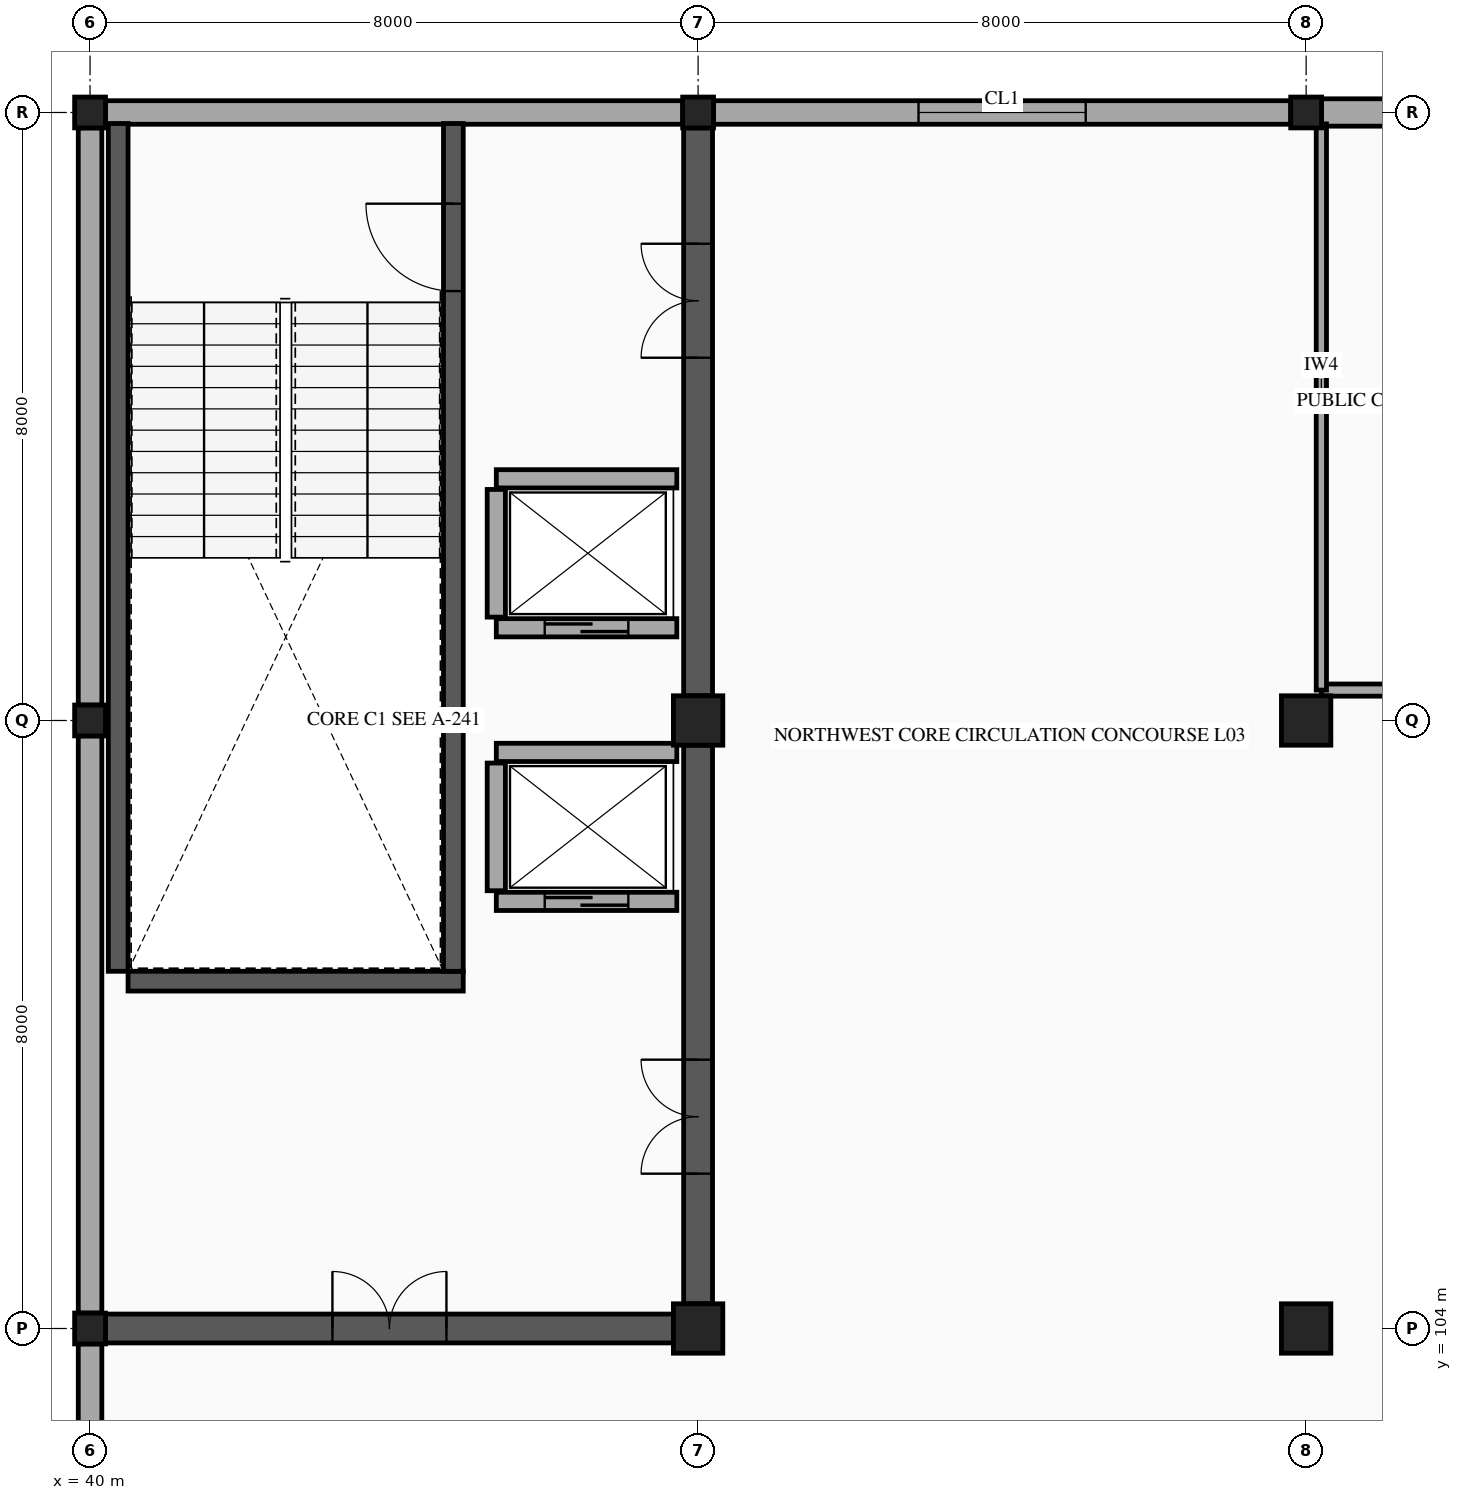
"""IFC4 building model, lengths in metres.
Left out: names, types, materials, properties, quantities, classifications, styles, units other than length and angle.
Written with IfcOpenShell. Run it as: python <this file> out.ifc"""

import sys

from ifc_helpers import new_model, si_unit, direction, frame, frame_2d, origin, origin_2d, place, context, subcontext, project, spatial, rectangle, hollow_rectangle, extrude, element, fill, save


model = new_model("IFC4")
c1 = context("Model", 3, precision=1e-05, world=origin(), true_north=direction((0.0, 1.0)))
c2 = subcontext(c1, "Body", "Model", "MODEL_VIEW")
j1 = project(units=[si_unit("LENGTHUNIT", "METRE"), si_unit("PLANEANGLEUNIT", "RADIAN")], contexts=[c1])
p1 = place(None, origin())
s1 = spatial("IfcSite", under=j1, at=p1, CompositionType="ELEMENT")
p2 = place(p1, origin())
s2 = spatial("IfcBuilding", under=s1, at=p2, CompositionType="ELEMENT")
p3 = place(p2, frame((0.0, 0.0, 14.9)))
s3 = spatial("IfcBuildingStorey", under=s2, at=p3, CompositionType="ELEMENT", Elevation=14.9)
for number, where, z_axis, x_axis in (
    (1, (40.0, 104.0, 0.0), (0.0, 0.0, 1.0), (1.0, 0.0, 0.0)),
    (2, (40.0, 112.0, 0.0), (0.0, 0.0, 1.0), (1.0, 0.0, 0.0)),
    (3, (40.0, 120.0, 0.0), (0.0, 0.0, 1.0), (1.0, 0.0, 0.0)),
):
    element("IfcColumn", number, at=place(p3, frame(where, z_axis=z_axis, x_axis=x_axis)), inside=s3, PredefinedType="COLUMN", context=c2, shape_type="SweptSolid", body=[
        extrude(hollow_rectangle(XDim=0.406, YDim=0.406, WallThickness=0.015, InnerFilletRadius=0.015, OuterFilletRadius=0.029, at=origin_2d()), origin(), (0.0, 0.0, 1.0), 4.5),
    ])
for number, where, z_axis, x_axis in (
    (4, (48.0, 104.0, 0.0), (0.0, 0.0, 1.0), (1.0, 0.0, 0.0)),
    (5, (48.0, 112.0, 0.0), (0.0, 0.0, 1.0), (1.0, 0.0, 0.0)),
):
    element("IfcColumn", number, at=place(p3, frame(where, z_axis=z_axis, x_axis=x_axis)), inside=s3, PredefinedType="COLUMN", context=c2, shape_type="SweptSolid", body=[
        extrude(rectangle(XDim=0.65, YDim=0.65, at=origin_2d()), origin(), (0.0, 0.0, 1.0), 4.5),
    ])
p4 = place(p3, frame((48.0, 120.0, 0.0), z_axis=(0.0, 0.0, 1.0), x_axis=(1.0, 0.0, 0.0)))
e6 = element("IfcColumn", 6, at=p4, inside=s3, PredefinedType="COLUMN", context=c2, shape_type="SweptSolid", body=[
    extrude(hollow_rectangle(XDim=0.406, YDim=0.406, WallThickness=0.015, InnerFilletRadius=0.015, OuterFilletRadius=0.029, at=origin_2d()), origin(), (0.0, 0.0, 1.0), 4.5),
])
for number, where, z_axis, x_axis in (
    (7, (56.0, 104.0, 0.0), (0.0, 0.0, 1.0), (1.0, 0.0, 0.0)),
    (8, (56.0, 112.0, 0.0), (0.0, 0.0, 1.0), (1.0, 0.0, 0.0)),
):
    element("IfcColumn", number, at=place(p3, frame(where, z_axis=z_axis, x_axis=x_axis)), inside=s3, PredefinedType="COLUMN", context=c2, shape_type="SweptSolid", body=[
        extrude(rectangle(XDim=0.65, YDim=0.65, at=origin_2d()), origin(), (0.0, 0.0, 1.0), 4.5),
    ])
p5 = place(p3, frame((56.0, 120.0, 0.0), z_axis=(0.0, 0.0, 1.0), x_axis=(1.0, 0.0, 0.0)))
e9 = element("IfcColumn", 9, at=p5, inside=s3, PredefinedType="COLUMN", context=c2, shape_type="SweptSolid", body=[
    extrude(hollow_rectangle(XDim=0.406, YDim=0.406, WallThickness=0.015, InnerFilletRadius=0.015, OuterFilletRadius=0.029, at=origin_2d()), origin(), (0.0, 0.0, 1.0), 4.5),
])
p6 = place(p3, frame((40.0, 96.203, 0.0), z_axis=(0.0, 0.0, 1.0), x_axis=(0.0, 1.0, 0.0)))
e10 = element("IfcWall", 10, at=p6, inside=s3, PredefinedType="STANDARD", context=c2, shape_type="SweptSolid", body=[
    extrude(rectangle(XDim=7.594, YDim=0.31, at=frame_2d((3.797, 0.0))), origin(), (0.0, 0.0, 1.0), 3.48),
])
p7 = place(p6, frame((2.697, 0.0, 0.8)))
e11 = element("IfcOpeningElement", 11, at=p7, cuts=e10, PredefinedType="OPENING", context=c2, shape_type="SweptSolid", body=[
    extrude(rectangle(XDim=2.2, YDim=2.05, at=frame_2d((1.1, 1.025))), frame((0.0, 0.165, 0.0), z_axis=(0.0, -1.0, 0.0), x_axis=(1.0, 0.0, 0.0)), (0.0, 0.0, 1.0), 0.33),
])
for number, where, z_axis, x_axis in (
    (12, (40.0, 104.203, 0.0), (0.0, 0.0, 1.0), (0.0, 1.0, 0.0)),
    (13, (40.0, 112.203, 0.0), (0.0, 0.0, 1.0), (0.0, 1.0, 0.0)),
    (14, (40.203, 120.0, 0.0), (0.0, 0.0, 1.0), (1.0, 0.0, 0.0)),
):
    element("IfcWall", number, at=place(p3, frame(where, z_axis=z_axis, x_axis=x_axis)), inside=s3, PredefinedType="STANDARD", context=c2, shape_type="SweptSolid", body=[
        extrude(rectangle(XDim=7.594, YDim=0.31, at=frame_2d((3.797, 0.0))), origin(), (0.0, 0.0, 1.0), 3.48),
    ])
p8 = place(p3, frame((48.203, 120.0, 0.0), z_axis=(0.0, 0.0, 1.0), x_axis=(1.0, 0.0, 0.0)))
e15 = element("IfcWall", 15, at=p8, inside=s3, PredefinedType="STANDARD", context=c2, shape_type="SweptSolid", body=[
    extrude(rectangle(XDim=7.594, YDim=0.31, at=frame_2d((3.797, 0.0))), origin(), (0.0, 0.0, 1.0), 3.48),
])
p9 = place(p8, frame((2.697, 0.0, 0.8)))
e16 = element("IfcOpeningElement", 16, at=p9, cuts=e15, PredefinedType="OPENING", context=c2, shape_type="SweptSolid", body=[
    extrude(rectangle(XDim=2.2, YDim=2.05, at=frame_2d((1.1, 1.025))), frame((0.0, 0.165, 0.0), z_axis=(0.0, -1.0, 0.0), x_axis=(1.0, 0.0, 0.0)), (0.0, 0.0, 1.0), 0.33),
])
p10 = place(p3, frame((56.203, 120.0, 0.0), z_axis=(0.0, 0.0, 1.0), x_axis=(1.0, 0.0, 0.0)))
e17 = element("IfcWall", 17, at=p10, inside=s3, PredefinedType="SOLIDWALL", context=c2, shape_type="SweptSolid", body=[
    extrude(rectangle(XDim=7.594, YDim=0.36, at=frame_2d((3.797, 0.0))), origin(), (0.0, 0.0, 1.0), 3.48),
])
p11 = place(p3, frame((40.5, 108.57, 0.0), z_axis=(0.0, 0.0, 1.0), x_axis=(1.0, 0.0, 0.0)))
e18 = element("IfcWall", 18, at=p11, inside=s3, PredefinedType="SHEAR", context=c2, shape_type="SweptSolid", body=[
    extrude(rectangle(XDim=4.41, YDim=0.26, at=frame_2d((2.205, 0.0))), origin(), (0.0, 0.0, 1.0), 4.28),
])
p12 = place(p3, frame((40.37, 108.7, 0.0), z_axis=(0.0, 0.0, 1.0), x_axis=(0.0, 1.0, 0.0)))
e19 = element("IfcWall", 19, at=p12, inside=s3, PredefinedType="SHEAR", context=c2, shape_type="SweptSolid", body=[
    extrude(rectangle(XDim=11.155, YDim=0.26, at=frame_2d((5.578, 0.0))), origin(), (0.0, 0.0, 1.0), 4.28),
])
p13 = place(p3, frame((44.78, 108.7, 0.0), z_axis=(0.0, 0.0, 1.0), x_axis=(0.0, 1.0, 0.0)))
e20 = element("IfcWall", 20, at=p13, inside=s3, PredefinedType="SHEAR", context=c2, shape_type="SweptSolid", body=[
    extrude(rectangle(XDim=11.155, YDim=0.26, at=frame_2d((5.578, 0.0))), origin(), (0.0, 0.0, 1.0), 4.28),
])
p14 = place(p13, frame((8.95, 0.0, 0.0)))
e21 = element("IfcOpeningElement", 21, at=p14, cuts=e20, PredefinedType="OPENING", context=c2, shape_type="SweptSolid", body=[
    extrude(rectangle(XDim=1.15, YDim=2.15, at=frame_2d((0.575, 1.075))), frame((0.0, 0.14, 0.0), z_axis=(0.0, -1.0, 0.0), x_axis=(1.0, 0.0, 0.0)), (0.0, 0.0, 1.0), 0.28),
])
p15 = place(p3, frame((40.203, 104.0, 0.0), z_axis=(0.0, 0.0, 1.0), x_axis=(1.0, 0.0, 0.0)))
e22 = element("IfcWall", 22, at=p15, inside=s3, PredefinedType="SHEAR", context=c2, shape_type="SweptSolid", body=[
    extrude(rectangle(XDim=7.472, YDim=0.38, at=frame_2d((3.736, 0.0))), origin(), (0.0, 0.0, 1.0), 4.28),
])
p16 = place(p15, frame((2.986, 0.0, 0.0)))
e23 = element("IfcOpeningElement", 23, at=p16, cuts=e22, PredefinedType="OPENING", context=c2, shape_type="SweptSolid", body=[
    extrude(rectangle(XDim=1.5, YDim=2.15, at=frame_2d((0.75, 1.075))), frame((0.0, 0.2, 0.0), z_axis=(0.0, -1.0, 0.0), x_axis=(1.0, 0.0, 0.0)), (0.0, 0.0, 1.0), 0.4),
])
p17 = place(p3, frame((48.0, 104.325, 0.0), z_axis=(0.0, 0.0, 1.0), x_axis=(0.0, 1.0, 0.0)))
e24 = element("IfcWall", 24, at=p17, inside=s3, PredefinedType="SHEAR", context=c2, shape_type="SweptSolid", body=[
    extrude(rectangle(XDim=7.35, YDim=0.38, at=frame_2d((3.675, 0.0))), origin(), (0.0, 0.0, 1.0), 4.28),
])
p18 = place(p17, frame((1.712, 0.0, 0.0)))
e25 = element("IfcOpeningElement", 25, at=p18, cuts=e24, PredefinedType="OPENING", context=c2, shape_type="SweptSolid", body=[
    extrude(rectangle(XDim=1.5, YDim=2.15, at=frame_2d((0.75, 1.075))), frame((0.0, 0.2, 0.0), z_axis=(0.0, -1.0, 0.0), x_axis=(1.0, 0.0, 0.0)), (0.0, 0.0, 1.0), 0.4),
])
p19 = place(p3, frame((48.0, 112.325, 0.0), z_axis=(0.0, 0.0, 1.0), x_axis=(0.0, 1.0, 0.0)))
e26 = element("IfcWall", 26, at=p19, inside=s3, PredefinedType="SHEAR", context=c2, shape_type="SweptSolid", body=[
    extrude(rectangle(XDim=7.472, YDim=0.38, at=frame_2d((3.736, 0.0))), origin(), (0.0, 0.0, 1.0), 4.28),
])
p20 = place(p19, frame((4.448, 0.0, 0.0)))
e27 = element("IfcOpeningElement", 27, at=p20, cuts=e26, PredefinedType="OPENING", context=c2, shape_type="SweptSolid", body=[
    extrude(rectangle(XDim=1.5, YDim=2.15, at=frame_2d((0.75, 1.075))), frame((0.0, 0.2, 0.0), z_axis=(0.0, -1.0, 0.0), x_axis=(1.0, 0.0, 0.0)), (0.0, 0.0, 1.0), 0.4),
])
p21 = place(p3, frame((45.345, 113.22, 0.0), z_axis=(0.0, 0.0, 1.0), x_axis=(1.0, 0.0, 0.0)))
e28 = element("IfcWall", 28, at=p21, inside=s3, PredefinedType="PARTITIONING", context=c2, shape_type="SweptSolid", body=[
    extrude(rectangle(XDim=2.375, YDim=0.24, at=frame_2d((1.188, 0.0))), origin(), (0.0, 0.0, 1.0), 4.28),
])
p22 = place(p21, frame((0.637, 0.0, 0.0)))
e29 = element("IfcOpeningElement", 29, at=p22, cuts=e28, PredefinedType="OPENING", context=c2, shape_type="SweptSolid", body=[
    extrude(rectangle(XDim=1.1, YDim=2.15, at=frame_2d((0.55, 1.075))), frame((0.0, 0.13, 0.0), z_axis=(0.0, -1.0, 0.0), x_axis=(1.0, 0.0, 0.0)), (0.0, 0.0, 1.0), 0.26),
])
p23 = place(p3, frame((45.345, 115.18, 0.0), z_axis=(0.0, 0.0, 1.0), x_axis=(1.0, 0.0, 0.0)))
e30 = element("IfcWall", 30, at=p23, inside=s3, PredefinedType="PARTITIONING", context=c2, shape_type="SweptSolid", body=[
    extrude(rectangle(XDim=2.375, YDim=0.24, at=frame_2d((1.188, 0.0))), origin(), (0.0, 0.0, 1.0), 4.28),
])
p24 = place(p3, frame((45.345, 113.36, 0.0), z_axis=(0.0, 0.0, 1.0), x_axis=(0.0, 1.0, 0.0)))
e31 = element("IfcWall", 31, at=p24, inside=s3, PredefinedType="PARTITIONING", context=c2, shape_type="SweptSolid", body=[
    extrude(rectangle(XDim=1.68, YDim=0.24, at=frame_2d((0.84, 0.0))), origin(), (0.0, 0.0, 1.0), 4.28),
])
p25 = place(p3, frame((45.345, 109.62, 0.0), z_axis=(0.0, 0.0, 1.0), x_axis=(1.0, 0.0, 0.0)))
e32 = element("IfcWall", 32, at=p25, inside=s3, PredefinedType="PARTITIONING", context=c2, shape_type="SweptSolid", body=[
    extrude(rectangle(XDim=2.375, YDim=0.24, at=frame_2d((1.188, 0.0))), origin(), (0.0, 0.0, 1.0), 4.28),
])
p26 = place(p25, frame((0.637, 0.0, 0.0)))
e33 = element("IfcOpeningElement", 33, at=p26, cuts=e32, PredefinedType="OPENING", context=c2, shape_type="SweptSolid", body=[
    extrude(rectangle(XDim=1.1, YDim=2.15, at=frame_2d((0.55, 1.075))), frame((0.0, 0.13, 0.0), z_axis=(0.0, -1.0, 0.0), x_axis=(1.0, 0.0, 0.0)), (0.0, 0.0, 1.0), 0.26),
])
p27 = place(p3, frame((45.345, 111.58, 0.0), z_axis=(0.0, 0.0, 1.0), x_axis=(1.0, 0.0, 0.0)))
e34 = element("IfcWall", 34, at=p27, inside=s3, PredefinedType="PARTITIONING", context=c2, shape_type="SweptSolid", body=[
    extrude(rectangle(XDim=2.375, YDim=0.24, at=frame_2d((1.188, 0.0))), origin(), (0.0, 0.0, 1.0), 4.28),
])
p28 = place(p3, frame((45.345, 109.76, 0.0), z_axis=(0.0, 0.0, 1.0), x_axis=(0.0, 1.0, 0.0)))
e35 = element("IfcWall", 35, at=p28, inside=s3, PredefinedType="PARTITIONING", context=c2, shape_type="SweptSolid", body=[
    extrude(rectangle(XDim=1.68, YDim=0.24, at=frame_2d((0.84, 0.0))), origin(), (0.0, 0.0, 1.0), 4.28),
])
p29 = place(p3, frame((56.2, 112.4, 0.0), z_axis=(0.0, 0.0, 1.0), x_axis=(1.0, 0.0, 0.0)))
e36 = element("IfcWall", 36, at=p29, inside=s3, PredefinedType="PARTITIONING", context=c2, shape_type="SweptSolid", body=[
    extrude(rectangle(XDim=4.7, YDim=0.16, at=frame_2d((2.35, 0.0))), origin(), (0.0, 0.0, 1.0), 3.48),
])
p30 = place(p29, frame((3.193, 0.0, 0.0)))
e37 = element("IfcOpeningElement", 37, at=p30, cuts=e36, PredefinedType="OPENING", context=c2, shape_type="SweptSolid", body=[
    extrude(rectangle(XDim=0.92, YDim=2.1, at=frame_2d((0.46, 1.05))), frame((0.0, 0.09, 0.0), z_axis=(0.0, -1.0, 0.0), x_axis=(1.0, 0.0, 0.0)), (0.0, 0.0, 1.0), 0.18),
])
p31 = place(p3, frame((56.2, 112.4, 0.0), z_axis=(0.0, 0.0, 1.0), x_axis=(0.0, 1.0, 0.0)))
e38 = element("IfcWall", 38, at=p31, inside=s3, PredefinedType="PARTITIONING", context=c2, shape_type="SweptSolid", body=[
    extrude(rectangle(XDim=7.45, YDim=0.135, at=frame_2d((3.725, 0.0))), origin(), (0.0, 0.0, 1.0), 3.48),
])
p32 = place(p9, origin())
e39 = element("IfcWindow", 39, at=p32, inside=s3, PartitioningType="DOUBLE_PANEL_VERTICAL", PredefinedType="WINDOW", context=c2, shape_type="SweptSolid", body=[
    extrude(rectangle(XDim=2.2, YDim=2.05, at=frame_2d((1.1, 1.025))), frame((0.0, 0.03, 0.0), z_axis=(0.0, -1.0, 0.0), x_axis=(1.0, 0.0, 0.0)), (0.0, 0.0, 1.0), 0.06),
])
fill(e16, e39)
p33 = place(p14, origin())
e40 = element("IfcDoor", 40, at=p33, inside=s3, OperationType="SINGLE_SWING_RIGHT", PredefinedType="DOOR", context=c2, shape_type="SweptSolid", body=[
    extrude(rectangle(XDim=1.15, YDim=2.15, at=frame_2d((0.575, 1.075))), frame((0.0, 0.025, 0.0), z_axis=(0.0, -1.0, 0.0), x_axis=(1.0, 0.0, 0.0)), (0.0, 0.0, 1.0), 0.05),
])
fill(e21, e40)
p34 = place(p16, origin())
e41 = element("IfcDoor", 41, at=p34, inside=s3, OperationType="DOUBLE_DOOR_SINGLE_SWING", PredefinedType="DOOR", context=c2, shape_type="SweptSolid", body=[
    extrude(rectangle(XDim=1.5, YDim=2.15, at=frame_2d((0.75, 1.075))), frame((0.0, 0.025, 0.0), z_axis=(0.0, -1.0, 0.0), x_axis=(1.0, 0.0, 0.0)), (0.0, 0.0, 1.0), 0.05),
])
fill(e23, e41)
p35 = place(p18, origin())
e42 = element("IfcDoor", 42, at=p35, inside=s3, OperationType="DOUBLE_DOOR_SINGLE_SWING", PredefinedType="DOOR", context=c2, shape_type="SweptSolid", body=[
    extrude(rectangle(XDim=1.5, YDim=2.15, at=frame_2d((0.75, 1.075))), frame((0.0, 0.025, 0.0), z_axis=(0.0, -1.0, 0.0), x_axis=(1.0, 0.0, 0.0)), (0.0, 0.0, 1.0), 0.05),
])
fill(e25, e42)
p36 = place(p20, origin())
e43 = element("IfcDoor", 43, at=p36, inside=s3, OperationType="DOUBLE_DOOR_SINGLE_SWING", PredefinedType="DOOR", context=c2, shape_type="SweptSolid", body=[
    extrude(rectangle(XDim=1.5, YDim=2.15, at=frame_2d((0.75, 1.075))), frame((0.0, 0.025, 0.0), z_axis=(0.0, -1.0, 0.0), x_axis=(1.0, 0.0, 0.0)), (0.0, 0.0, 1.0), 0.05),
])
fill(e27, e43)
p37 = place(p22, origin())
e44 = element("IfcDoor", 44, at=p37, inside=s3, OperationType="SLIDING_TO_LEFT", PredefinedType="DOOR", context=c2, shape_type="SweptSolid", body=[
    extrude(rectangle(XDim=1.1, YDim=2.15, at=frame_2d((0.55, 1.075))), frame((0.0, 0.025, 0.0), z_axis=(0.0, -1.0, 0.0), x_axis=(1.0, 0.0, 0.0)), (0.0, 0.0, 1.0), 0.05),
])
fill(e29, e44)
p38 = place(p26, origin())
e45 = element("IfcDoor", 45, at=p38, inside=s3, OperationType="SLIDING_TO_LEFT", PredefinedType="DOOR", context=c2, shape_type="SweptSolid", body=[
    extrude(rectangle(XDim=1.1, YDim=2.15, at=frame_2d((0.55, 1.075))), frame((0.0, 0.025, 0.0), z_axis=(0.0, -1.0, 0.0), x_axis=(1.0, 0.0, 0.0)), (0.0, 0.0, 1.0), 0.05),
])
fill(e33, e45)
save(model, sys.argv[1])
